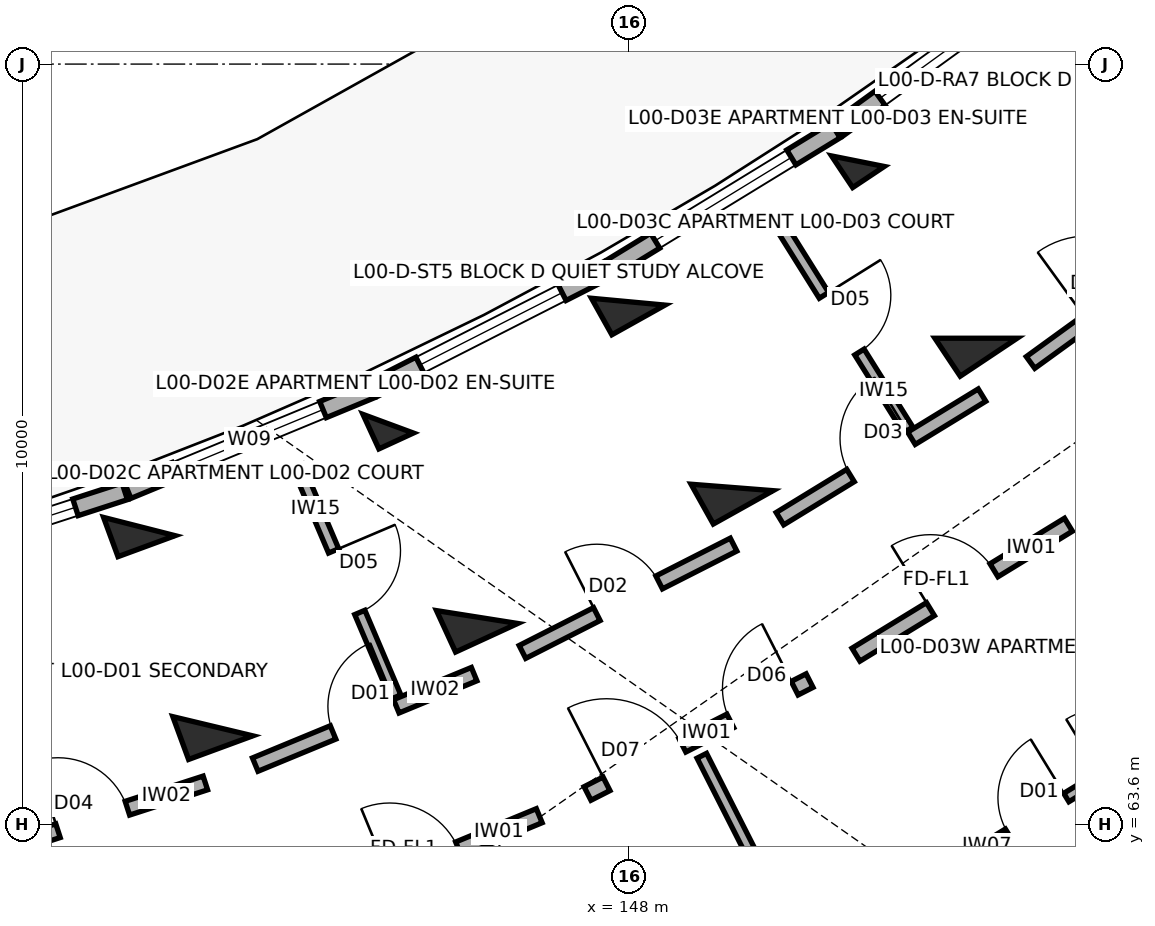
"""IFC4 building model, lengths in metres.
Left out: names, types, materials, properties, quantities, classifications, styles, units other than length and angle.
Written with IfcOpenShell. Run it as: python <this file> out.ifc"""

import sys

from ifc_helpers import new_model, si_unit, direction, frame, frame_2d, origin, origin_2d, place, context, subcontext, project, spatial, rectangle, extrude, element, fill, save


model = new_model("IFC4")
c1 = context("Model", 3, precision=1e-05, world=origin(), true_north=direction((0.0, 1.0)))
c2 = subcontext(c1, "Body", "Model", "MODEL_VIEW")
j1 = project(units=[si_unit("LENGTHUNIT", "METRE"), si_unit("PLANEANGLEUNIT", "RADIAN")], contexts=[c1])
p1 = place(None, origin())
s1 = spatial("IfcSite", under=j1, at=p1, CompositionType="ELEMENT")
p2 = place(p1, origin())
s2 = spatial("IfcBuilding", under=s1, at=p2, CompositionType="ELEMENT")
p3 = place(p2, origin())
s3 = spatial("IfcBuildingStorey", under=s2, at=p3, CompositionType="ELEMENT", Elevation=0.0)
p4 = place(p3, frame((141.56, 67.515, 0.0), z_axis=(0.0, 0.0, 1.0), x_axis=(0.345298198999, -0.93849302276, 0.0)))
e1 = element("IfcColumn", 1, at=p4, inside=s3, PredefinedType="COLUMN", context=c2, shape_type="SweptSolid", body=[
    extrude(rectangle(XDim=0.55, YDim=0.8, at=origin_2d()), origin(), (0.0, 0.0, 1.0), 4.5),
])
p5 = place(p3, frame((142.527, 64.887, 0.0), z_axis=(0.0, 0.0, 1.0), x_axis=(0.345298198999, -0.93849302276, 0.0)))
e2 = element("IfcColumn", 2, at=p5, inside=s3, PredefinedType="COLUMN", context=c2, shape_type="SweptSolid", body=[
    extrude(rectangle(XDim=0.6, YDim=0.9, at=origin_2d()), origin(), (0.0, 0.0, 1.0), 4.5),
])
p6 = place(p3, frame((144.834, 68.868, 0.0), z_axis=(0.0, 0.0, 1.0), x_axis=(0.417867073801, -0.908508177527, 0.0)))
e3 = element("IfcColumn", 3, at=p6, inside=s3, PredefinedType="COLUMN", context=c2, shape_type="SweptSolid", body=[
    extrude(rectangle(XDim=0.5, YDim=0.5, at=origin_2d()), origin(), (0.0, 0.0, 1.0), 4.5),
])
p7 = place(p3, frame((146.004, 66.324, 0.0), z_axis=(0.0, 0.0, 1.0), x_axis=(0.417867073801, -0.908508177527, 0.0)))
e4 = element("IfcColumn", 4, at=p7, inside=s3, PredefinedType="COLUMN", context=c2, shape_type="SweptSolid", body=[
    extrude(rectangle(XDim=0.6, YDim=0.9, at=origin_2d()), origin(), (0.0, 0.0, 1.0), 4.5),
])
p8 = place(p3, frame((147.992, 70.474, 0.0), z_axis=(0.0, 0.0, 1.0), x_axis=(0.487859659139, -0.87292207727, 0.0)))
e5 = element("IfcColumn", 5, at=p8, inside=s3, PredefinedType="COLUMN", context=c2, shape_type="SweptSolid", body=[
    extrude(rectangle(XDim=0.55, YDim=0.8, at=origin_2d()), origin(), (0.0, 0.0, 1.0), 4.5),
])
for number, where, z_axis, x_axis in (
    (6, (149.358, 68.03, 0.0), (0.0, 0.0, 1.0), (0.488, -0.873, 0.0)),
    (7, (152.227, 62.897, 0.0), (0.0, 0.0, 1.0), (0.488, -0.873, 0.0)),
):
    element("IfcColumn", number, at=place(p3, frame(where, z_axis=z_axis, x_axis=x_axis)), inside=s3, PredefinedType="COLUMN", context=c2, shape_type="SweptSolid", body=[
        extrude(rectangle(XDim=0.6, YDim=0.9, at=origin_2d()), origin(), (0.0, 0.0, 1.0), 4.5),
    ])
p9 = place(p3, frame((151.015, 72.322, 0.0), z_axis=(0.0, 0.0, 1.0), x_axis=(0.554844427448, -0.83195412213, 0.0)))
e8 = element("IfcColumn", 8, at=p9, inside=s3, PredefinedType="COLUMN", context=c2, shape_type="SweptSolid", body=[
    extrude(rectangle(XDim=0.5, YDim=0.5, at=origin_2d()), origin(), (0.0, 0.0, 1.0), 4.5),
])
p10 = place(p3, frame((152.568, 69.993, 0.0), z_axis=(0.0, 0.0, 1.0), x_axis=(0.554844427448, -0.83195412213, 0.0)))
e9 = element("IfcColumn", 9, at=p10, inside=s3, PredefinedType="COLUMN", context=c2, shape_type="SweptSolid", body=[
    extrude(rectangle(XDim=0.6, YDim=0.9, at=origin_2d()), origin(), (0.0, 0.0, 1.0), 4.5),
])
p11 = place(p3, frame((138.073, 66.911, 0.0), z_axis=(0.0, 0.0, 1.0), x_axis=(0.951327869213, 0.308180604935, 0.0)))
e10 = element("IfcWall", 10, at=p11, inside=s3, PredefinedType="SOLIDWALL", context=c2, shape_type="SweptSolid", body=[
    extrude(rectangle(XDim=3.463, YDim=0.23, at=frame_2d((1.732, 0.0))), origin(), (0.0, 0.0, 1.0), 3.45),
])
p12 = place(p11, frame((0.682, 0.0, 0.32)))
e11 = element("IfcOpeningElement", 11, at=p12, cuts=e10, PredefinedType="OPENING", context=c2, shape_type="SweptSolid", body=[
    extrude(rectangle(XDim=2.1, YDim=1.65, at=frame_2d((1.05, 0.825))), frame((0.0, 0.125, 0.0), z_axis=(0.0, -1.0, 0.0), x_axis=(1.0, 0.0, 0.0)), (0.0, 0.0, 1.0), 0.25),
])
p13 = place(p3, frame((141.406, 67.992, 0.0), z_axis=(0.0, 0.0, 1.0), x_axis=(0.924221949388, 0.381855716561, 0.0)))
e12 = element("IfcWall", 12, at=p13, inside=s3, PredefinedType="SOLIDWALL", context=c2, shape_type="SweptSolid", body=[
    extrude(rectangle(XDim=3.463, YDim=0.23, at=frame_2d((1.732, 0.0))), origin(), (0.0, 0.0, 1.0), 3.45),
])
p14 = place(p13, frame((0.682, 0.0, 0.32)))
e13 = element("IfcOpeningElement", 13, at=p14, cuts=e12, PredefinedType="OPENING", context=c2, shape_type="SweptSolid", body=[
    extrude(rectangle(XDim=2.1, YDim=1.65, at=frame_2d((1.05, 0.825))), frame((0.0, 0.125, 0.0), z_axis=(0.0, -1.0, 0.0), x_axis=(1.0, 0.0, 0.0)), (0.0, 0.0, 1.0), 0.25),
])
p15 = place(p3, frame((144.643, 69.332, 0.0), z_axis=(0.0, 0.0, 1.0), x_axis=(0.891418434034, 0.453181172893, 0.0)))
e14 = element("IfcWall", 14, at=p15, inside=s3, PredefinedType="SOLIDWALL", context=c2, shape_type="SweptSolid", body=[
    extrude(rectangle(XDim=3.463, YDim=0.23, at=frame_2d((1.732, 0.0))), origin(), (0.0, 0.0, 1.0), 3.45),
])
p16 = place(p15, frame((0.682, 0.0, 0.32)))
e15 = element("IfcOpeningElement", 15, at=p16, cuts=e14, PredefinedType="OPENING", context=c2, shape_type="SweptSolid", body=[
    extrude(rectangle(XDim=2.1, YDim=1.65, at=frame_2d((1.05, 0.825))), frame((0.0, 0.125, 0.0), z_axis=(0.0, -1.0, 0.0), x_axis=(1.0, 0.0, 0.0)), (0.0, 0.0, 1.0), 0.25),
])
p17 = place(p3, frame((147.765, 70.921, 0.0), z_axis=(0.0, 0.0, 1.0), x_axis=(0.85310231885, 0.521743647371, 0.0)))
e16 = element("IfcWall", 16, at=p17, inside=s3, PredefinedType="SOLIDWALL", context=c2, shape_type="SweptSolid", body=[
    extrude(rectangle(XDim=3.464, YDim=0.23, at=frame_2d((1.732, 0.0))), origin(), (0.0, 0.0, 1.0), 3.45),
])
p18 = place(p17, frame((0.682, 0.0, 0.32)))
e17 = element("IfcOpeningElement", 17, at=p18, cuts=e16, PredefinedType="OPENING", context=c2, shape_type="SweptSolid", body=[
    extrude(rectangle(XDim=2.1, YDim=1.65, at=frame_2d((1.05, 0.825))), frame((0.0, 0.125, 0.0), z_axis=(0.0, -1.0, 0.0), x_axis=(1.0, 0.0, 0.0)), (0.0, 0.0, 1.0), 0.25),
])
p19 = place(p3, frame((150.753, 72.75, 0.0), z_axis=(0.0, 0.0, 1.0), x_axis=(0.809540089106, 0.587064599623, 0.0)))
e18 = element("IfcWall", 18, at=p19, inside=s3, PredefinedType="SOLIDWALL", context=c2, shape_type="SweptSolid", body=[
    extrude(rectangle(XDim=3.463, YDim=0.23, at=frame_2d((1.732, 0.0))), origin(), (0.0, 0.0, 1.0), 3.45),
])
p20 = place(p19, frame((0.682, 0.0, 0.32)))
e19 = element("IfcOpeningElement", 19, at=p20, cuts=e18, PredefinedType="OPENING", context=c2, shape_type="SweptSolid", body=[
    extrude(rectangle(XDim=2.1, YDim=1.65, at=frame_2d((1.05, 0.825))), frame((0.0, 0.125, 0.0), z_axis=(0.0, -1.0, 0.0), x_axis=(1.0, 0.0, 0.0)), (0.0, 0.0, 1.0), 0.25),
])
p21 = place(p3, frame((139.464, 63.181, 0.0), z_axis=(0.0, 0.0, 1.0), x_axis=(0.951336474448, 0.308154040027, 0.0)))
e20 = element("IfcWall", 20, at=p21, inside=s3, PredefinedType="SOLIDWALL", context=c2, shape_type="SweptSolid", body=[
    extrude(rectangle(XDim=3.116, YDim=0.19, at=frame_2d((1.558, 0.0))), origin(), (0.0, 0.0, 1.0), 3.34),
])
p22 = place(p21, frame((1.078, 0.0, 0.0)))
e21 = element("IfcOpeningElement", 21, at=p22, cuts=e20, PredefinedType="OPENING", context=c2, shape_type="SweptSolid", body=[
    extrude(rectangle(XDim=0.96, YDim=2.1, at=frame_2d((0.48, 1.05))), frame((0.0, 0.105, 0.0), z_axis=(0.0, -1.0, 0.0), x_axis=(1.0, 0.0, 0.0)), (0.0, 0.0, 1.0), 0.21),
])
p23 = place(p3, frame((143.793, 62.459, 0.0), z_axis=(0.0, 0.0, 1.0), x_axis=(0.924214561665, 0.381873596896, 0.0)))
e22 = element("IfcWall", 22, at=p23, inside=s3, PredefinedType="SOLIDWALL", context=c2, shape_type="SweptSolid", body=[
    extrude(rectangle(XDim=3.277, YDim=0.2, at=frame_2d((1.639, 0.0))), origin(), (0.0, 0.0, 1.0), 3.34),
])
p24 = place(p23, frame((1.148, 0.0, 0.0)))
e23 = element("IfcOpeningElement", 23, at=p24, cuts=e22, PredefinedType="OPENING", context=c2, shape_type="SweptSolid", body=[
    extrude(rectangle(XDim=0.98, YDim=2.15, at=frame_2d((0.49, 1.075))), frame((0.0, 0.11, 0.0), z_axis=(0.0, -1.0, 0.0), x_axis=(1.0, 0.0, 0.0)), (0.0, 0.0, 1.0), 0.22),
])
p25 = place(p3, frame((143.085, 64.383, 0.0), z_axis=(0.0, 0.0, 1.0), x_axis=(0.924213340202, 0.381876553081, 0.0)))
e24 = element("IfcWall", 24, at=p25, inside=s3, PredefinedType="SOLIDWALL", context=c2, shape_type="SweptSolid", body=[
    extrude(rectangle(XDim=3.116, YDim=0.19, at=frame_2d((1.558, 0.0))), origin(), (0.0, 0.0, 1.0), 3.34),
])
p26 = place(p25, frame((1.108, 0.0, 0.0)))
e25 = element("IfcOpeningElement", 25, at=p26, cuts=e24, PredefinedType="OPENING", context=c2, shape_type="SweptSolid", body=[
    extrude(rectangle(XDim=0.9, YDim=2.1, at=frame_2d((0.45, 1.05))), frame((0.0, 0.105, 0.0), z_axis=(0.0, -1.0, 0.0), x_axis=(1.0, 0.0, 0.0)), (0.0, 0.0, 1.0), 0.21),
])
p27 = place(p3, frame((143.643, 68.308, 0.0), z_axis=(0.0, 0.0, 1.0), x_axis=(0.391203300693, -0.920304285292, 0.0)))
e26 = element("IfcWall", 26, at=p27, inside=s3, PredefinedType="PARTITIONING", context=c2, shape_type="SweptSolid", body=[
    extrude(rectangle(XDim=3.3, YDim=0.145, at=frame_2d((1.65, 0.0))), origin(), (0.0, 0.0, 1.0), 3.34),
])
p28 = place(p27, frame((1.21, 0.0, 0.0)))
e27 = element("IfcOpeningElement", 27, at=p28, cuts=e26, PredefinedType="OPENING", context=c2, shape_type="SweptSolid", body=[
    extrude(rectangle(XDim=0.88, YDim=2.1, at=frame_2d((0.44, 1.05))), frame((0.0, 0.083, 0.0), z_axis=(0.0, -1.0, 0.0), x_axis=(1.0, 0.0, 0.0)), (0.0, 0.0, 1.0), 0.165),
])
p29 = place(p3, frame((147.457, 64.003, 0.0), z_axis=(0.0, 0.0, 1.0), x_axis=(0.891412167565, 0.45319349898, 0.0)))
e28 = element("IfcWall", 28, at=p29, inside=s3, PredefinedType="SOLIDWALL", context=c2, shape_type="SweptSolid", body=[
    extrude(rectangle(XDim=3.277, YDim=0.2, at=frame_2d((1.639, 0.0))), origin(), (0.0, 0.0, 1.0), 3.34),
])
p30 = place(p29, frame((0.28, 0.0, 0.0)))
e29 = element("IfcOpeningElement", 29, at=p30, cuts=e28, PredefinedType="OPENING", context=c2, shape_type="SweptSolid", body=[
    extrude(rectangle(XDim=1.12, YDim=2.15, at=frame_2d((0.56, 1.075))), frame((0.0, 0.11, 0.0), z_axis=(0.0, -1.0, 0.0), x_axis=(1.0, 0.0, 0.0)), (0.0, 0.0, 1.0), 0.22),
])
p31 = place(p29, frame((2.107, 0.0, 0.0)))
e30 = element("IfcOpeningElement", 30, at=p31, cuts=e28, PredefinedType="OPENING", context=c2, shape_type="SweptSolid", body=[
    extrude(rectangle(XDim=0.95, YDim=2.1, at=frame_2d((0.475, 1.05))), frame((0.0, 0.11, 0.0), z_axis=(0.0, -1.0, 0.0), x_axis=(1.0, 0.0, 0.0)), (0.0, 0.0, 1.0), 0.22),
])
p32 = place(p3, frame((146.6, 65.865, 0.0), z_axis=(0.0, 0.0, 1.0), x_axis=(0.891414101388, 0.453189695212, 0.0)))
e31 = element("IfcWall", 31, at=p32, inside=s3, PredefinedType="SOLIDWALL", context=c2, shape_type="SweptSolid", body=[
    extrude(rectangle(XDim=3.116, YDim=0.19, at=frame_2d((1.558, 0.0))), origin(), (0.0, 0.0, 1.0), 3.34),
])
p33 = place(p32, frame((1.098, 0.0, 0.0)))
e32 = element("IfcOpeningElement", 32, at=p33, cuts=e31, PredefinedType="OPENING", context=c2, shape_type="SweptSolid", body=[
    extrude(rectangle(XDim=0.92, YDim=2.1, at=frame_2d((0.46, 1.05))), frame((0.0, 0.105, 0.0), z_axis=(0.0, -1.0, 0.0), x_axis=(1.0, 0.0, 0.0)), (0.0, 0.0, 1.0), 0.21),
])
p34 = place(p3, frame((148.96, 64.499, 0.0), z_axis=(0.0, 0.0, 1.0), x_axis=(0.451912010816, -0.892062517137, 0.0)))
e33 = element("IfcWall", 33, at=p34, inside=s3, PredefinedType="PARTITIONING", context=c2, shape_type="SweptSolid", body=[
    extrude(rectangle(XDim=7.95, YDim=0.14, at=frame_2d((3.975, 0.0))), origin(), (0.0, 0.0, 1.0), 3.34),
])
p35 = place(p34, frame((6.05, 0.0, 0.0)))
e34 = element("IfcOpeningElement", 34, at=p35, cuts=e33, PredefinedType="OPENING", context=c2, shape_type="SweptSolid", body=[
    extrude(rectangle(XDim=0.92, YDim=2.1, at=frame_2d((0.46, 1.05))), frame((0.0, 0.08, 0.0), z_axis=(0.0, -1.0, 0.0), x_axis=(1.0, 0.0, 0.0)), (0.0, 0.0, 1.0), 0.16),
])
p36 = place(p3, frame((150.989, 65.829, 0.0), z_axis=(0.0, 0.0, 1.0), x_axis=(0.853090237845, 0.521763400492, 0.0)))
e35 = element("IfcWall", 35, at=p36, inside=s3, PredefinedType="SOLIDWALL", context=c2, shape_type="SweptSolid", body=[
    extrude(rectangle(XDim=3.277, YDim=0.2, at=frame_2d((1.638, 0.0))), origin(), (0.0, 0.0, 1.0), 3.34),
])
p37 = place(p36, frame((1.148, 0.0, 0.0)))
e36 = element("IfcOpeningElement", 36, at=p37, cuts=e35, PredefinedType="OPENING", context=c2, shape_type="SweptSolid", body=[
    extrude(rectangle(XDim=0.98, YDim=2.15, at=frame_2d((0.49, 1.075))), frame((0.0, 0.11, 0.0), z_axis=(0.0, -1.0, 0.0), x_axis=(1.0, 0.0, 0.0)), (0.0, 0.0, 1.0), 0.22),
])
p38 = place(p3, frame((149.989, 67.619, 0.0), z_axis=(0.0, 0.0, 1.0), x_axis=(0.853121049608, 0.5217130195, 0.0)))
e37 = element("IfcWall", 37, at=p38, inside=s3, PredefinedType="SOLIDWALL", context=c2, shape_type="SweptSolid", body=[
    extrude(rectangle(XDim=3.116, YDim=0.19, at=frame_2d((1.558, 0.0))), origin(), (0.0, 0.0, 1.0), 3.34),
])
p39 = place(p38, frame((1.088, 0.0, 0.0)))
e38 = element("IfcOpeningElement", 38, at=p39, cuts=e37, PredefinedType="OPENING", context=c2, shape_type="SweptSolid", body=[
    extrude(rectangle(XDim=0.94, YDim=2.1, at=frame_2d((0.47, 1.05))), frame((0.0, 0.105, 0.0), z_axis=(0.0, -1.0, 0.0), x_axis=(1.0, 0.0, 0.0)), (0.0, 0.0, 1.0), 0.21),
])
p40 = place(p3, frame((149.926, 71.583, 0.0), z_axis=(0.0, 0.0, 1.0), x_axis=(0.5303779416, -0.847761310196, 0.0)))
e39 = element("IfcWall", 39, at=p40, inside=s3, PredefinedType="PARTITIONING", context=c2, shape_type="SweptSolid", body=[
    extrude(rectangle(XDim=3.3, YDim=0.145, at=frame_2d((1.65, 0.0))), origin(), (0.0, 0.0, 1.0), 3.34),
])
p41 = place(p40, frame((1.21, 0.0, 0.0)))
e40 = element("IfcOpeningElement", 40, at=p41, cuts=e39, PredefinedType="OPENING", context=c2, shape_type="SweptSolid", body=[
    extrude(rectangle(XDim=0.88, YDim=2.1, at=frame_2d((0.44, 1.05))), frame((0.0, 0.083, 0.0), z_axis=(0.0, -1.0, 0.0), x_axis=(1.0, 0.0, 0.0)), (0.0, 0.0, 1.0), 0.165),
])
p42 = place(p3, frame((152.434, 63.141, 0.0), z_axis=(0.0, 0.0, 1.0), x_axis=(0.853089873067, 0.521763996909, 0.0)))
e41 = element("IfcWall", 41, at=p42, inside=s3, PredefinedType="PARTITIONING", context=c2, shape_type="SweptSolid", body=[
    extrude(rectangle(XDim=3.616, YDim=0.13, at=frame_2d((1.808, 0.0))), origin(), (0.0, 0.0, 1.0), 3.34),
])
p43 = place(p42, frame((0.65, 0.0, 0.0)))
e42 = element("IfcOpeningElement", 42, at=p43, cuts=e41, PredefinedType="OPENING", context=c2, shape_type="SweptSolid", body=[
    extrude(rectangle(XDim=0.9, YDim=2.1, at=frame_2d((0.45, 1.05))), frame((0.0, 0.075, 0.0), z_axis=(0.0, -1.0, 0.0), x_axis=(1.0, 0.0, 0.0)), (0.0, 0.0, 1.0), 0.15),
])
p44 = place(p42, frame((2.086, 0.0, 0.0)))
e43 = element("IfcOpeningElement", 43, at=p44, cuts=e41, PredefinedType="OPENING", context=c2, shape_type="SweptSolid", body=[
    extrude(rectangle(XDim=0.88, YDim=2.1, at=frame_2d((0.44, 1.05))), frame((0.0, 0.075, 0.0), z_axis=(0.0, -1.0, 0.0), x_axis=(1.0, 0.0, 0.0)), (0.0, 0.0, 1.0), 0.15),
])
p45 = place(p3, frame((153.285, 69.674, 0.0), z_axis=(0.0, 0.0, 1.0), x_axis=(0.809505174959, 0.587112741911, 0.0)))
e44 = element("IfcWall", 44, at=p45, inside=s3, PredefinedType="SOLIDWALL", context=c2, shape_type="SweptSolid", body=[
    extrude(rectangle(XDim=2.976, YDim=0.19, at=frame_2d((1.488, 0.0))), origin(), (0.0, 0.0, 1.0), 3.34),
])
p46 = place(p45, frame((0.928, 0.0, 0.0)))
e45 = element("IfcOpeningElement", 45, at=p46, cuts=e44, PredefinedType="OPENING", context=c2, shape_type="SweptSolid", body=[
    extrude(rectangle(XDim=1.12, YDim=2.15, at=frame_2d((0.56, 1.075))), frame((0.0, 0.105, 0.0), z_axis=(0.0, -1.0, 0.0), x_axis=(1.0, 0.0, 0.0)), (0.0, 0.0, 1.0), 0.21),
])
p47 = place(p12, origin())
e46 = element("IfcWindow", 46, at=p47, inside=s3, PartitioningType="TRIPLE_PANEL_VERTICAL", PredefinedType="WINDOW", context=c2, shape_type="SweptSolid", body=[
    extrude(rectangle(XDim=2.1, YDim=1.65, at=frame_2d((1.05, 0.825))), frame((0.0, 0.03, 0.0), z_axis=(0.0, -1.0, 0.0), x_axis=(1.0, 0.0, 0.0)), (0.0, 0.0, 1.0), 0.06),
])
fill(e11, e46)
p48 = place(p14, origin())
e47 = element("IfcWindow", 47, at=p48, inside=s3, PartitioningType="TRIPLE_PANEL_VERTICAL", PredefinedType="WINDOW", context=c2, shape_type="SweptSolid", body=[
    extrude(rectangle(XDim=2.1, YDim=1.65, at=frame_2d((1.05, 0.825))), frame((0.0, 0.03, 0.0), z_axis=(0.0, -1.0, 0.0), x_axis=(1.0, 0.0, 0.0)), (0.0, 0.0, 1.0), 0.06),
])
fill(e13, e47)
p49 = place(p16, origin())
e48 = element("IfcWindow", 48, at=p49, inside=s3, PartitioningType="TRIPLE_PANEL_VERTICAL", PredefinedType="WINDOW", context=c2, shape_type="SweptSolid", body=[
    extrude(rectangle(XDim=2.1, YDim=1.65, at=frame_2d((1.05, 0.825))), frame((0.0, 0.03, 0.0), z_axis=(0.0, -1.0, 0.0), x_axis=(1.0, 0.0, 0.0)), (0.0, 0.0, 1.0), 0.06),
])
fill(e15, e48)
p50 = place(p18, origin())
e49 = element("IfcWindow", 49, at=p50, inside=s3, PartitioningType="TRIPLE_PANEL_VERTICAL", PredefinedType="WINDOW", context=c2, shape_type="SweptSolid", body=[
    extrude(rectangle(XDim=2.1, YDim=1.65, at=frame_2d((1.05, 0.825))), frame((0.0, 0.03, 0.0), z_axis=(0.0, -1.0, 0.0), x_axis=(1.0, 0.0, 0.0)), (0.0, 0.0, 1.0), 0.06),
])
fill(e17, e49)
p51 = place(p20, origin())
e50 = element("IfcWindow", 50, at=p51, inside=s3, PartitioningType="TRIPLE_PANEL_VERTICAL", PredefinedType="WINDOW", context=c2, shape_type="SweptSolid", body=[
    extrude(rectangle(XDim=2.1, YDim=1.65, at=frame_2d((1.05, 0.825))), frame((0.0, 0.03, 0.0), z_axis=(0.0, -1.0, 0.0), x_axis=(1.0, 0.0, 0.0)), (0.0, 0.0, 1.0), 0.06),
])
fill(e19, e50)
p52 = place(p22, origin())
e51 = element("IfcDoor", 51, at=p52, inside=s3, OperationType="SINGLE_SWING_LEFT", PredefinedType="DOOR", context=c2, shape_type="SweptSolid", body=[
    extrude(rectangle(XDim=0.96, YDim=2.1, at=frame_2d((0.48, 1.05))), frame((0.0, 0.025, 0.0), z_axis=(0.0, -1.0, 0.0), x_axis=(1.0, 0.0, 0.0)), (0.0, 0.0, 1.0), 0.05),
])
fill(e21, e51)
p53 = place(p26, origin())
e52 = element("IfcDoor", 52, at=p53, inside=s3, OperationType="SINGLE_SWING_RIGHT", PredefinedType="DOOR", context=c2, shape_type="SweptSolid", body=[
    extrude(rectangle(XDim=0.9, YDim=2.1, at=frame_2d((0.45, 1.05))), frame((0.0, 0.025, 0.0), z_axis=(0.0, -1.0, 0.0), x_axis=(1.0, 0.0, 0.0)), (0.0, 0.0, 1.0), 0.05),
])
fill(e25, e52)
p54 = place(p28, origin())
e53 = element("IfcDoor", 53, at=p54, inside=s3, OperationType="SINGLE_SWING_LEFT", PredefinedType="DOOR", context=c2, shape_type="SweptSolid", body=[
    extrude(rectangle(XDim=0.88, YDim=2.1, at=frame_2d((0.44, 1.05))), frame((0.0, 0.025, 0.0), z_axis=(0.0, -1.0, 0.0), x_axis=(1.0, 0.0, 0.0)), (0.0, 0.0, 1.0), 0.05),
])
fill(e27, e53)
p55 = place(p30, origin())
e54 = element("IfcDoor", 54, at=p55, inside=s3, OperationType="SINGLE_SWING_LEFT", PredefinedType="DOOR", context=c2, shape_type="SweptSolid", body=[
    extrude(rectangle(XDim=1.12, YDim=2.15, at=frame_2d((0.56, 1.075))), frame((0.0, 0.025, 0.0), z_axis=(0.0, -1.0, 0.0), x_axis=(1.0, 0.0, 0.0)), (0.0, 0.0, 1.0), 0.05),
])
fill(e29, e54)
p56 = place(p31, origin())
e55 = element("IfcDoor", 55, at=p56, inside=s3, OperationType="SINGLE_SWING_RIGHT", PredefinedType="DOOR", context=c2, shape_type="SweptSolid", body=[
    extrude(rectangle(XDim=0.95, YDim=2.1, at=frame_2d((0.475, 1.05))), frame((0.0, 0.025, 0.0), z_axis=(0.0, -1.0, 0.0), x_axis=(1.0, 0.0, 0.0)), (0.0, 0.0, 1.0), 0.05),
])
fill(e30, e55)
p57 = place(p33, origin())
e56 = element("IfcDoor", 56, at=p57, inside=s3, OperationType="SINGLE_SWING_LEFT", PredefinedType="DOOR", context=c2, shape_type="SweptSolid", body=[
    extrude(rectangle(XDim=0.92, YDim=2.1, at=frame_2d((0.46, 1.05))), frame((0.0, 0.025, 0.0), z_axis=(0.0, -1.0, 0.0), x_axis=(1.0, 0.0, 0.0)), (0.0, 0.0, 1.0), 0.05),
])
fill(e32, e56)
p58 = place(p37, origin())
e57 = element("IfcDoor", 57, at=p58, inside=s3, OperationType="SINGLE_SWING_LEFT", PredefinedType="DOOR", context=c2, shape_type="SweptSolid", body=[
    extrude(rectangle(XDim=0.98, YDim=2.15, at=frame_2d((0.49, 1.075))), frame((0.0, 0.025, 0.0), z_axis=(0.0, -1.0, 0.0), x_axis=(1.0, 0.0, 0.0)), (0.0, 0.0, 1.0), 0.05),
])
fill(e36, e57)
p59 = place(p39, origin())
e58 = element("IfcDoor", 58, at=p59, inside=s3, OperationType="SINGLE_SWING_RIGHT", PredefinedType="DOOR", context=c2, shape_type="SweptSolid", body=[
    extrude(rectangle(XDim=0.94, YDim=2.1, at=frame_2d((0.47, 1.05))), frame((0.0, 0.025, 0.0), z_axis=(0.0, -1.0, 0.0), x_axis=(1.0, 0.0, 0.0)), (0.0, 0.0, 1.0), 0.05),
])
fill(e38, e58)
p60 = place(p41, origin())
e59 = element("IfcDoor", 59, at=p60, inside=s3, OperationType="SINGLE_SWING_LEFT", PredefinedType="DOOR", context=c2, shape_type="SweptSolid", body=[
    extrude(rectangle(XDim=0.88, YDim=2.1, at=frame_2d((0.44, 1.05))), frame((0.0, 0.025, 0.0), z_axis=(0.0, -1.0, 0.0), x_axis=(1.0, 0.0, 0.0)), (0.0, 0.0, 1.0), 0.05),
])
fill(e40, e59)
p61 = place(p43, origin())
e60 = element("IfcDoor", 60, at=p61, inside=s3, OperationType="SINGLE_SWING_RIGHT", PredefinedType="DOOR", context=c2, shape_type="SweptSolid", body=[
    extrude(rectangle(XDim=0.9, YDim=2.1, at=frame_2d((0.45, 1.05))), frame((0.0, 0.025, 0.0), z_axis=(0.0, -1.0, 0.0), x_axis=(1.0, 0.0, 0.0)), (0.0, 0.0, 1.0), 0.05),
])
fill(e42, e60)
save(model, sys.argv[1])
